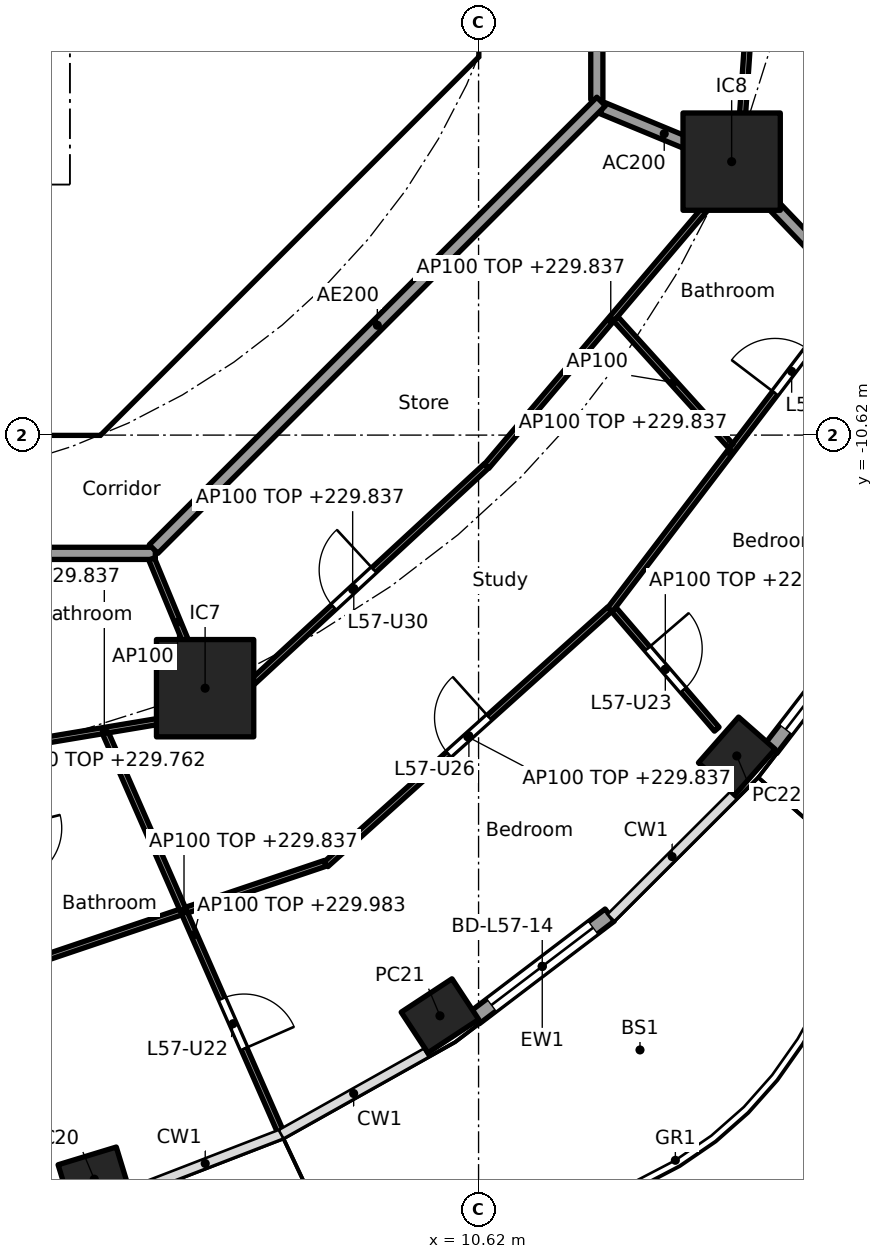
"""IFC4 building model, lengths in metres.
Left out: names, types, materials, properties, quantities, classifications, styles, units other than length and angle.
Written with IfcOpenShell. Run it as: python <this file> out.ifc"""

import sys

from ifc_helpers import new_model, si_unit, direction, frame, frame_2d, origin, origin_2d, place, context, subcontext, project, spatial, polyline, rectangle, hollow_rectangle, outline, extrude, element, fill, save


model = new_model("IFC4")
c1 = context("Model", 3, precision=1e-05, world=origin(), true_north=direction((0.0, 1.0)))
c2 = subcontext(c1, "Body", "Model", "MODEL_VIEW")
j1 = project(units=[si_unit("LENGTHUNIT", "METRE"), si_unit("PLANEANGLEUNIT", "RADIAN")], contexts=[c1])
p1 = place(None, origin())
s1 = spatial("IfcSite", under=j1, at=p1, CompositionType="ELEMENT")
p2 = place(p1, origin())
s2 = spatial("IfcBuilding", under=s1, at=p2, CompositionType="ELEMENT")
p3 = place(p2, frame((0.0, 0.0, 227.0)))
s3 = spatial("IfcBuildingStorey", under=s2, at=p3, CompositionType="ELEMENT", Elevation=227.0)
for number, where, z_axis, x_axis in (
    (1, (4.3, -22.856, 0.0), (0.0, 0.0, 1.0), (0.957, 0.292, 0.0)),
    (2, (9.985, -20.17, 0.0), (0.0, 0.0, 1.0), (0.836, 0.549, 0.0)),
    (3, (14.866, -15.896, 0.0), (0.0, 0.0, 1.0), (0.66, 0.751, 0.0)),
):
    element("IfcColumn", number, at=place(p3, frame(where, z_axis=z_axis, x_axis=x_axis)), inside=s3, PredefinedType="COLUMN", context=c2, shape_type="SweptSolid", body=[
        extrude(hollow_rectangle(XDim=1.0, YDim=0.8, WallThickness=0.032, at=origin_2d()), origin(), (0.0, 0.0, 1.0), 3.7),
    ])
for number, where, z_axis, x_axis in (
    (4, (6.123, -14.782, 0.0), (0.0, 0.0, 1.0), (1.0, 0.0, 0.0)),
    (5, (14.782, -6.123, 0.0), (0.0, 0.0, 1.0), (1.0, 0.0, 0.0)),
):
    element("IfcColumn", number, at=place(p3, frame(where, z_axis=z_axis, x_axis=x_axis)), inside=s3, PredefinedType="COLUMN", context=c2, shape_type="SweptSolid", body=[
        extrude(rectangle(XDim=1.6, YDim=1.6, at=origin_2d()), origin(), (0.0, 0.0, 1.0), 3.7),
    ])
p4 = place(p3, frame((12.777, -18.513, 0.0), z_axis=(0.0, 0.0, 1.0), x_axis=(-0.796022158395, -0.605267480825, 0.0)))
e6 = element("IfcWall", 6, at=p4, inside=s3, PredefinedType="SOLIDWALL", context=c2, shape_type="SweptSolid", body=[
    extrude(rectangle(XDim=2.789, YDim=0.25, at=frame_2d((1.395, 0.0))), origin(), (0.0, 0.0, 1.0), 3.44),
])
p5 = place(p4, frame((0.344, 0.0, 0.0)))
e7 = element("IfcOpeningElement", 7, at=p5, cuts=e6, PredefinedType="OPENING", context=c2, shape_type="SweptSolid", body=[
    extrude(rectangle(XDim=2.1, YDim=2.4, at=frame_2d((1.05, 1.2))), frame((0.0, 0.135, 0.0), z_axis=(0.0, -1.0, 0.0), x_axis=(1.0, 0.0, 0.0)), (0.0, 0.0, 1.0), 0.27),
])
p6 = place(p3, frame((17.197, -13.48, 0.0), z_axis=(0.0, 0.0, 1.0), x_axis=(-0.610438565676, -0.792063607001, 0.0)))
e8 = element("IfcWall", 8, at=p6, inside=s3, PredefinedType="SOLIDWALL", context=c2, shape_type="SweptSolid", body=[
    extrude(rectangle(XDim=2.901, YDim=0.25, at=frame_2d((1.45, 0.0))), origin(), (0.0, 0.0, 1.0), 3.44),
])
p7 = place(p6, frame((0.4, 0.0, 0.0)))
e9 = element("IfcOpeningElement", 9, at=p7, cuts=e8, PredefinedType="OPENING", context=c2, shape_type="SweptSolid", body=[
    extrude(rectangle(XDim=2.1, YDim=2.4, at=frame_2d((1.05, 1.2))), frame((0.0, 0.135, 0.0), z_axis=(0.0, -1.0, 0.0), x_axis=(1.0, 0.0, 0.0)), (0.0, 0.0, 1.0), 0.27),
])
p8 = place(p3, frame((4.613, -9.988, 0.0), z_axis=(0.0, 0.0, 1.0), x_axis=(0.707106781187, 0.707106781187, 0.0)))
e10 = element("IfcWall", 10, at=p8, inside=s3, PredefinedType="SHEAR", context=c2, shape_type="SweptSolid", body=[
    extrude(rectangle(XDim=7.602, YDim=0.6, at=frame_2d((3.801, 0.0))), origin(), (0.0, 0.0, 1.0), 3.44),
])
p9 = place(p8, frame((3.201, 0.0, 0.0)))
e11 = element("IfcOpeningElement", 11, at=p9, cuts=e10, PredefinedType="OPENING", context=c2, shape_type="SweptSolid", body=[
    extrude(rectangle(XDim=1.2, YDim=2.1, at=frame_2d((0.6, 1.05))), frame((0.0, 0.31, 0.0), z_axis=(0.0, -1.0, 0.0), x_axis=(1.0, 0.0, 0.0)), (0.0, 0.0, 1.0), 0.62),
])
p10 = place(p3, frame((4.0, -10.025, 0.0), z_axis=(0.0, 0.0, 1.0), x_axis=(0.0, 1.0, 0.0)))
e12 = element("IfcWall", 12, at=p10, inside=s3, PredefinedType="SOLIDWALL", context=c2, shape_type="SweptSolid", body=[
    extrude(rectangle(XDim=3.0, YDim=0.2, at=frame_2d((1.5, 0.0))), origin(), (0.0, 0.0, 1.0), 3.44),
])
p11 = place(p10, frame((0.975, 0.0, 0.0)))
e13 = element("IfcOpeningElement", 13, at=p11, cuts=e12, PredefinedType="OPENING", context=c2, shape_type="SweptSolid", body=[
    extrude(rectangle(XDim=1.1, YDim=2.1, at=frame_2d((0.55, 1.05))), frame((0.0, 0.11, 0.0), z_axis=(0.0, -1.0, 0.0), x_axis=(1.0, 0.0, 0.0)), (0.0, 0.0, 1.0), 0.22),
])
p12 = place(p3, frame((4.0, -6.5, 0.0), z_axis=(0.0, 0.0, 1.0), x_axis=(0.0, 1.0, 0.0)))
e14 = element("IfcWall", 14, at=p12, inside=s3, PredefinedType="SOLIDWALL", context=c2, shape_type="SweptSolid", body=[
    extrude(rectangle(XDim=2.2, YDim=0.2, at=frame_2d((1.1, 0.0))), origin(), (0.0, 0.0, 1.0), 3.44),
])
p13 = place(p12, frame((0.55, 0.0, 0.0)))
e15 = element("IfcOpeningElement", 15, at=p13, cuts=e14, PredefinedType="OPENING", context=c2, shape_type="SweptSolid", body=[
    extrude(rectangle(XDim=1.1, YDim=2.1, at=frame_2d((0.55, 1.05))), frame((0.0, 0.11, 0.0), z_axis=(0.0, -1.0, 0.0), x_axis=(1.0, 0.0, 0.0)), (0.0, 0.0, 1.0), 0.22),
])
p14 = place(p3, origin())
e16 = element("IfcWall", 16, at=p14, inside=s3, PredefinedType="SHEAR", context=c2, shape_type="SweptSolid", body=[
    extrude(outline(polyline([(-4.152, -10.025), (4.152, -10.025), (4.401, -9.776), (4.825, -10.2), (4.401, -10.625), (-4.401, -10.625), (-4.825, -10.2), (-4.401, -9.776), (-4.152, -10.025)])), origin(), (0.0, 0.0, 1.0), 3.44),
])
p15 = place(p3, origin())
e17 = element("IfcWall", 17, at=p15, inside=s3, PredefinedType="SHEAR", context=c2, shape_type="SweptSolid", body=[
    extrude(outline(polyline([(9.776, -4.401), (10.025, -4.152), (10.025, -3.801), (10.025, 4.152), (9.776, 4.401), (10.2, 4.825), (10.625, 4.401), (10.625, -4.401), (10.2, -4.825), (9.776, -4.401)])), origin(), (0.0, 0.0, 1.0), 3.44),
])
p16 = place(p3, origin())
e18 = element("IfcWall", 18, at=p16, inside=s3, PredefinedType="SOLIDWALL", context=c2, shape_type="SweptSolid", body=[
    extrude(outline(polyline([(4.1, -7.025), (-4.1, -7.025), (-4.1, -6.5), (4.1, -6.5), (4.1, -7.025)])), origin(), (0.0, 0.0, 1.0), 3.44),
])
p17 = place(p3, frame((12.657, -5.243, 0.0), z_axis=(0.0, 0.0, 1.0), x_axis=(0.923853160736, -0.382747093259, 0.0)))
e19 = element("IfcWall", 19, at=p17, inside=s3, PredefinedType="PARTITIONING", context=c2, shape_type="SweptSolid", body=[
    extrude(rectangle(XDim=2.2, YDim=0.2, at=frame_2d((1.1, 0.0))), origin(), (0.0, 0.0, 1.0), 3.44),
])
p18 = place(p3, frame((14.817, -6.159, 0.0), z_axis=(0.0, 0.0, 1.0), x_axis=(0.691437669875, -0.722436120828, 0.0)))
e20 = element("IfcWall", 20, at=p18, inside=s3, PredefinedType="PARTITIONING", context=c2, shape_type="SweptSolid", body=[
    extrude(rectangle(XDim=5.104, YDim=0.2, at=frame_2d((2.552, 0.0))), origin(), (0.0, 0.0, 1.0), 3.44),
])
p19 = place(p3, frame((12.565, -5.104, 0.0), z_axis=(0.0, 0.0, 1.0), x_axis=(0.0, 1.0, 0.0)))
e21 = element("IfcWall", 21, at=p19, inside=s3, PredefinedType="PARTITIONING", context=c2, shape_type="SweptSolid", body=[
    extrude(rectangle(XDim=10.209, YDim=0.2, at=frame_2d((5.104, 0.0))), origin(), (0.0, 0.0, 1.0), 3.44),
])
p20 = place(p3, frame((-5.104, -12.565, 0.0), z_axis=(0.0, 0.0, 1.0), x_axis=(1.0, 0.0, 0.0)))
e22 = element("IfcWall", 22, at=p20, inside=s3, PredefinedType="PARTITIONING", context=c2, shape_type="SweptSolid", body=[
    extrude(rectangle(XDim=10.409, YDim=0.2, at=frame_2d((5.205, 0.0))), origin(), (0.0, 0.0, 1.0), 3.44),
])
p21 = place(p20, frame((4.604, 0.0, 0.0)))
e23 = element("IfcOpeningElement", 23, at=p21, cuts=e22, PredefinedType="OPENING", context=c2, shape_type="SweptSolid", body=[
    extrude(rectangle(XDim=1.0, YDim=2.1, at=frame_2d((0.5, 1.05))), frame((0.0, 0.11, 0.0), z_axis=(0.0, -1.0, 0.0), x_axis=(1.0, 0.0, 0.0)), (0.0, 0.0, 1.0), 0.22),
])
p22 = place(p3, frame((5.275, -12.494, 0.0), z_axis=(0.0, 0.0, 1.0), x_axis=(0.707106781187, 0.707106781187, 0.0)))
e24 = element("IfcWall", 24, at=p22, inside=s3, PredefinedType="PARTITIONING", context=c2, shape_type="SweptSolid", body=[
    extrude(rectangle(XDim=10.409, YDim=0.2, at=frame_2d((5.205, 0.0))), origin(), (0.0, 0.0, 1.0), 3.44),
])
p23 = place(p3, frame((15.48, 2.199, 0.0), z_axis=(0.0, 0.0, 1.0), x_axis=(-0.068558685949, -0.997647085186, 0.0)))
e25 = element("IfcWall", 25, at=p23, inside=s3, PredefinedType="PARTITIONING", context=c2, shape_type="SweptSolid", body=[
    extrude(rectangle(XDim=8.365, YDim=0.1, at=frame_2d((4.183, 0.0))), origin(), (0.0, 0.0, 1.0), 2.837),
])
p24 = place(p23, frame((0.74, 0.0, 0.0)))
e26 = element("IfcOpeningElement", 26, at=p24, cuts=e25, PredefinedType="OPENING", context=c2, shape_type="SweptSolid", body=[
    extrude(rectangle(XDim=0.9, YDim=2.1, at=frame_2d((0.45, 1.05))), frame((0.0, 0.06, 0.0), z_axis=(0.0, -1.0, 0.0), x_axis=(1.0, 0.0, 0.0)), (0.0, 0.0, 1.0), 0.12),
])
p25 = place(p3, frame((2.593, -15.789, 0.0), z_axis=(0.0, 0.0, 1.0), x_axis=(0.986381756816, 0.164471972749, 0.0)))
e27 = element("IfcWall", 27, at=p25, inside=s3, PredefinedType="PARTITIONING", context=c2, shape_type="SweptSolid", body=[
    extrude(rectangle(XDim=3.797, YDim=0.1, at=frame_2d((1.898, 0.0))), origin(), (0.0, 0.0, 1.0), 2.837),
])
p26 = place(p3, frame((3.453, -19.229, 0.0), z_axis=(0.0, 0.0, 1.0), x_axis=(0.947572025416, 0.319542261133, 0.0)))
e28 = element("IfcWall", 28, at=p26, inside=s3, PredefinedType="PARTITIONING", context=c2, shape_type="SweptSolid", body=[
    extrude(rectangle(XDim=4.903, YDim=0.1, at=frame_2d((2.451, 0.0))), origin(), (0.0, 0.0, 1.0), 2.837),
])
p27 = place(p3, frame((4.485, -15.522, 0.0), z_axis=(0.0, 0.0, 1.0), x_axis=(0.401959715825, -0.915657352318, 0.0)))
e29 = element("IfcWall", 29, at=p27, inside=s3, PredefinedType="PARTITIONING", context=c2, shape_type="SweptSolid", body=[
    extrude(rectangle(XDim=7.239, YDim=0.1, at=frame_2d((3.619, 0.0))), origin(), (0.0, 0.0, 1.0), 2.983),
])
p28 = place(p27, frame((4.767, 0.0, 0.0)))
e30 = element("IfcOpeningElement", 30, at=p28, cuts=e29, PredefinedType="OPENING", context=c2, shape_type="SweptSolid", body=[
    extrude(rectangle(XDim=0.9, YDim=2.1, at=frame_2d((0.45, 1.05))), frame((0.0, 0.06, 0.0), z_axis=(0.0, -1.0, 0.0), x_axis=(1.0, 0.0, 0.0)), (0.0, 0.0, 1.0), 0.12),
])
p29 = place(p3, frame((5.243, -12.657, 0.0), z_axis=(0.0, 0.0, 1.0), x_axis=(0.382719158442, -0.923864733477, 0.0)))
e31 = element("IfcWall", 31, at=p29, inside=s3, PredefinedType="PARTITIONING", context=c2, shape_type="SweptSolid", body=[
    extrude(rectangle(XDim=2.25, YDim=0.1, at=frame_2d((1.125, 0.0))), origin(), (0.0, 0.0, 1.0), 3.44),
])
p30 = place(p3, frame((6.351, -15.19, 0.0), z_axis=(0.0, 0.0, 1.0), x_axis=(0.73462674599, 0.678471476243, 0.0)))
e32 = element("IfcWall", 32, at=p30, inside=s3, PredefinedType="PARTITIONING", context=c2, shape_type="SweptSolid", body=[
    extrude(rectangle(XDim=5.987, YDim=0.1, at=frame_2d((2.993, 0.0))), origin(), (0.0, 0.0, 1.0), 2.837),
])
p31 = place(p30, frame((2.568, 0.0, 0.0)))
e33 = element("IfcOpeningElement", 33, at=p31, cuts=e32, PredefinedType="OPENING", context=c2, shape_type="SweptSolid", body=[
    extrude(rectangle(XDim=0.9, YDim=2.1, at=frame_2d((0.45, 1.05))), frame((0.0, 0.06, 0.0), z_axis=(0.0, -1.0, 0.0), x_axis=(1.0, 0.0, 0.0)), (0.0, 0.0, 1.0), 0.12),
])
p32 = place(p3, frame((8.109, -17.679, 0.0), z_axis=(0.0, 0.0, 1.0), x_axis=(0.743675165651, 0.668541134108, 0.0)))
e34 = element("IfcWall", 34, at=p32, inside=s3, PredefinedType="PARTITIONING", context=c2, shape_type="SweptSolid", body=[
    extrude(rectangle(XDim=6.275, YDim=0.1, at=frame_2d((3.137, 0.0))), origin(), (0.0, 0.0, 1.0), 2.837),
])
p33 = place(p32, frame((2.712, 0.0, 0.0)))
e35 = element("IfcOpeningElement", 35, at=p33, cuts=e34, PredefinedType="OPENING", context=c2, shape_type="SweptSolid", body=[
    extrude(rectangle(XDim=0.9, YDim=2.1, at=frame_2d((0.45, 1.05))), frame((0.0, 0.06, 0.0), z_axis=(0.0, -1.0, 0.0), x_axis=(1.0, 0.0, 0.0)), (0.0, 0.0, 1.0), 0.12),
])
p34 = place(p3, frame((10.753, -11.132, 0.0), z_axis=(0.0, 0.0, 1.0), x_axis=(0.646987675252, 0.762500457752, 0.0)))
e36 = element("IfcWall", 36, at=p34, inside=s3, PredefinedType="PARTITIONING", context=c2, shape_type="SweptSolid", body=[
    extrude(rectangle(XDim=6.309, YDim=0.1, at=frame_2d((3.154, 0.0))), origin(), (0.0, 0.0, 1.0), 2.837),
])
p35 = place(p3, frame((12.845, -13.489, 0.0), z_axis=(0.0, 0.0, 1.0), x_axis=(0.652092276587, -0.758139606416, 0.0)))
e37 = element("IfcWall", 37, at=p35, inside=s3, PredefinedType="PARTITIONING", context=c2, shape_type="SweptSolid", body=[
    extrude(rectangle(XDim=2.594, YDim=0.1, at=frame_2d((1.297, 0.0))), origin(), (0.0, 0.0, 1.0), 2.837),
])
p36 = place(p35, frame((0.847, 0.0, 0.0)))
e38 = element("IfcOpeningElement", 38, at=p36, cuts=e37, PredefinedType="OPENING", context=c2, shape_type="SweptSolid", body=[
    extrude(rectangle(XDim=0.9, YDim=2.1, at=frame_2d((0.45, 1.05))), frame((0.0, 0.06, 0.0), z_axis=(0.0, -1.0, 0.0), x_axis=(1.0, 0.0, 0.0)), (0.0, 0.0, 1.0), 0.12),
])
p37 = place(p3, frame((12.782, -13.491, 0.0), z_axis=(0.0, 0.0, 1.0), x_axis=(0.606141365852, 0.79535692906, 0.0)))
e39 = element("IfcWall", 39, at=p37, inside=s3, PredefinedType="PARTITIONING", context=c2, shape_type="SweptSolid", body=[
    extrude(rectangle(XDim=6.52, YDim=0.1, at=frame_2d((3.26, 0.0))), origin(), (0.0, 0.0, 1.0), 2.837),
])
p38 = place(p37, frame((4.477, 0.0, 0.0)))
e40 = element("IfcOpeningElement", 40, at=p38, cuts=e39, PredefinedType="OPENING", context=c2, shape_type="SweptSolid", body=[
    extrude(rectangle(XDim=0.9, YDim=2.1, at=frame_2d((0.45, 1.05))), frame((0.0, 0.06, 0.0), z_axis=(0.0, -1.0, 0.0), x_axis=(1.0, 0.0, 0.0)), (0.0, 0.0, 1.0), 0.12),
])
p39 = place(p3, frame((12.876, -8.707, 0.0), z_axis=(0.0, 0.0, 1.0), x_axis=(0.670768418052, -0.741666858733, 0.0)))
e41 = element("IfcWall", 41, at=p39, inside=s3, PredefinedType="PARTITIONING", context=c2, shape_type="SweptSolid", body=[
    extrude(rectangle(XDim=2.824, YDim=0.1, at=frame_2d((1.412, 0.0))), origin(), (0.0, 0.0, 1.0), 3.44),
])
p40 = place(p5, origin())
e42 = element("IfcDoor", 42, at=p40, inside=s3, OperationType="SLIDING_TO_LEFT", PredefinedType="DOOR", context=c2, shape_type="SweptSolid", body=[
    extrude(rectangle(XDim=2.1, YDim=2.4, at=frame_2d((1.05, 1.2))), frame((0.0, 0.025, 0.0), z_axis=(0.0, -1.0, 0.0), x_axis=(1.0, 0.0, 0.0)), (0.0, 0.0, 1.0), 0.05),
])
fill(e7, e42)
p41 = place(p7, origin())
e43 = element("IfcDoor", 43, at=p41, inside=s3, OperationType="SLIDING_TO_LEFT", PredefinedType="DOOR", context=c2, shape_type="SweptSolid", body=[
    extrude(rectangle(XDim=2.1, YDim=2.4, at=frame_2d((1.05, 1.2))), frame((0.0, 0.025, 0.0), z_axis=(0.0, -1.0, 0.0), x_axis=(1.0, 0.0, 0.0)), (0.0, 0.0, 1.0), 0.05),
])
fill(e9, e43)
p42 = place(p13, origin())
e44 = element("IfcDoor", 44, at=p42, inside=s3, OperationType="DOUBLE_DOOR_SLIDING", PredefinedType="DOOR", context=c2, shape_type="SweptSolid", body=[
    extrude(rectangle(XDim=1.1, YDim=2.1, at=frame_2d((0.55, 1.05))), frame((0.0, 0.025, 0.0), z_axis=(0.0, -1.0, 0.0), x_axis=(1.0, 0.0, 0.0)), (0.0, 0.0, 1.0), 0.05),
])
fill(e15, e44)
p43 = place(p11, origin())
e45 = element("IfcDoor", 45, at=p43, inside=s3, OperationType="SINGLE_SWING_LEFT", PredefinedType="DOOR", context=c2, shape_type="SweptSolid", body=[
    extrude(rectangle(XDim=1.1, YDim=2.1, at=frame_2d((0.55, 1.05))), frame((0.0, 0.025, 0.0), z_axis=(0.0, -1.0, 0.0), x_axis=(1.0, 0.0, 0.0)), (0.0, 0.0, 1.0), 0.05),
])
fill(e13, e45)
p44 = place(p9, origin())
e46 = element("IfcDoor", 46, at=p44, inside=s3, OperationType="SINGLE_SWING_LEFT", PredefinedType="DOOR", context=c2, shape_type="SweptSolid", body=[
    extrude(rectangle(XDim=1.2, YDim=2.1, at=frame_2d((0.6, 1.05))), frame((0.0, 0.025, 0.0), z_axis=(0.0, -1.0, 0.0), x_axis=(1.0, 0.0, 0.0)), (0.0, 0.0, 1.0), 0.05),
])
fill(e11, e46)
p45 = place(p28, origin())
e47 = element("IfcDoor", 47, at=p45, inside=s3, OperationType="SINGLE_SWING_RIGHT", PredefinedType="DOOR", context=c2, shape_type="SweptSolid", body=[
    extrude(rectangle(XDim=0.9, YDim=2.1, at=frame_2d((0.45, 1.05))), frame((0.0, 0.025, 0.0), z_axis=(0.0, -1.0, 0.0), x_axis=(1.0, 0.0, 0.0)), (0.0, 0.0, 1.0), 0.05),
])
fill(e30, e47)
p46 = place(p36, origin())
e48 = element("IfcDoor", 48, at=p46, inside=s3, OperationType="SINGLE_SWING_LEFT", PredefinedType="DOOR", context=c2, shape_type="SweptSolid", body=[
    extrude(rectangle(XDim=0.9, YDim=2.1, at=frame_2d((0.45, 1.05))), frame((0.0, 0.025, 0.0), z_axis=(0.0, -1.0, 0.0), x_axis=(1.0, 0.0, 0.0)), (0.0, 0.0, 1.0), 0.05),
])
fill(e38, e48)
p47 = place(p33, origin())
e49 = element("IfcDoor", 49, at=p47, inside=s3, OperationType="SINGLE_SWING_RIGHT", PredefinedType="DOOR", context=c2, shape_type="SweptSolid", body=[
    extrude(rectangle(XDim=0.9, YDim=2.1, at=frame_2d((0.45, 1.05))), frame((0.0, 0.025, 0.0), z_axis=(0.0, -1.0, 0.0), x_axis=(1.0, 0.0, 0.0)), (0.0, 0.0, 1.0), 0.05),
])
fill(e35, e49)
p48 = place(p38, origin())
e50 = element("IfcDoor", 50, at=p48, inside=s3, OperationType="SINGLE_SWING_LEFT", PredefinedType="DOOR", context=c2, shape_type="SweptSolid", body=[
    extrude(rectangle(XDim=0.9, YDim=2.1, at=frame_2d((0.45, 1.05))), frame((0.0, 0.025, 0.0), z_axis=(0.0, -1.0, 0.0), x_axis=(1.0, 0.0, 0.0)), (0.0, 0.0, 1.0), 0.05),
])
fill(e40, e50)
p49 = place(p31, origin())
e51 = element("IfcDoor", 51, at=p49, inside=s3, OperationType="SINGLE_SWING_RIGHT", PredefinedType="DOOR", context=c2, shape_type="SweptSolid", body=[
    extrude(rectangle(XDim=0.9, YDim=2.1, at=frame_2d((0.45, 1.05))), frame((0.0, 0.025, 0.0), z_axis=(0.0, -1.0, 0.0), x_axis=(1.0, 0.0, 0.0)), (0.0, 0.0, 1.0), 0.05),
])
fill(e33, e51)
save(model, sys.argv[1])
